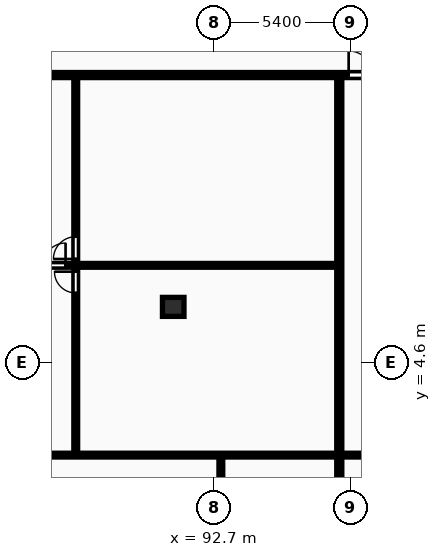
"""IFC4 building model, lengths in metres.
Left out: names, types, materials, properties, quantities, classifications, styles, units other than length and angle.
Written with IfcOpenShell. Run it as: python <this file> out.ifc"""

import sys

from ifc_helpers import new_model, si_unit, direction, frame, frame_2d, origin, origin_2d, place, context, subcontext, project, spatial, rectangle, extrude, element, fill, save


model = new_model("IFC4")
c1 = context("Model", 3, precision=1e-05, world=origin(), true_north=direction((0.0, 1.0)))
c2 = subcontext(c1, "Body", "Model", "MODEL_VIEW")
j1 = project(units=[si_unit("LENGTHUNIT", "METRE"), si_unit("PLANEANGLEUNIT", "RADIAN")], contexts=[c1])
p1 = place(None, origin())
s1 = spatial("IfcSite", under=j1, at=p1, CompositionType="ELEMENT")
p2 = place(p1, origin())
s2 = spatial("IfcBuilding", under=s1, at=p2, CompositionType="ELEMENT")
p3 = place(p2, frame((0.0, 0.0, 132.8)))
s3 = spatial("IfcBuildingStorey", under=s2, at=p3, CompositionType="ELEMENT", Elevation=132.8)
p4 = place(p3, frame((91.1, 6.8, 0.0), z_axis=(0.0, 0.0, 1.0), x_axis=(1.0, 0.0, 0.0)))
e1 = element("IfcColumn", 1, at=p4, inside=s3, PredefinedType="COLUMN", context=c2, shape_type="SweptSolid", body=[
    extrude(rectangle(XDim=0.85, YDim=0.75, at=origin_2d()), origin(), (0.0, 0.0, 1.0), 3.25),
])
p5 = place(p3, frame((97.655, -8.7, 0.0), z_axis=(0.0, 0.0, 1.0), x_axis=(0.0, 1.0, 0.0)))
e2 = element("IfcWall", 2, at=p5, inside=s3, PredefinedType="PARTITIONING", context=c2, shape_type="SweptSolid", body=[
    extrude(rectangle(XDim=24.57, YDim=0.2, at=frame_2d((12.285, 0.0))), origin(), (0.0, 0.0, 1.0), 2.97),
])
p6 = place(p3, frame((87.252, 0.99, 0.0), z_axis=(0.0, 0.0, 1.0), x_axis=(0.0, 1.0, 0.0)))
e3 = element("IfcWall", 3, at=p6, inside=s3, PredefinedType="PARTITIONING", context=c2, shape_type="SweptSolid", body=[
    extrude(rectangle(XDim=14.9, YDim=0.15, at=frame_2d((7.45, 0.0))), origin(), (0.0, 0.0, 1.0), 2.97),
])
p7 = place(p6, frame((6.36, 0.0, 0.0)))
e4 = element("IfcOpeningElement", 4, at=p7, cuts=e3, PredefinedType="OPENING", context=c2, shape_type="SweptSolid", body=[
    extrude(rectangle(XDim=0.84, YDim=2.04, at=frame_2d((0.42, 1.02))), frame((0.0, 0.085, 0.0), z_axis=(0.0, -1.0, 0.0), x_axis=(1.0, 0.0, 0.0)), (0.0, 0.0, 1.0), 0.17),
])
p8 = place(p6, frame((7.7, 0.0, 0.0)))
e5 = element("IfcOpeningElement", 5, at=p8, cuts=e3, PredefinedType="OPENING", context=c2, shape_type="SweptSolid", body=[
    extrude(rectangle(XDim=0.88, YDim=2.06, at=frame_2d((0.44, 1.03))), frame((0.0, 0.085, 0.0), z_axis=(0.0, -1.0, 0.0), x_axis=(1.0, 0.0, 0.0)), (0.0, 0.0, 1.0), 0.17),
])
p9 = place(p3, frame((76.73, 8.44, 0.0), z_axis=(0.0, 0.0, 1.0), x_axis=(1.0, 0.0, 0.0)))
e6 = element("IfcWall", 6, at=p9, inside=s3, PredefinedType="PARTITIONING", context=c2, shape_type="SweptSolid", body=[
    extrude(rectangle(XDim=20.844, YDim=0.15, at=frame_2d((10.422, 0.0))), origin(), (0.0, 0.0, 1.0), 2.97),
])
p10 = place(p9, frame((9.241, 0.0, 0.0)))
e7 = element("IfcOpeningElement", 7, at=p10, cuts=e6, PredefinedType="OPENING", context=c2, shape_type="SweptSolid", body=[
    extrude(rectangle(XDim=0.88, YDim=2.06, at=frame_2d((0.44, 1.03))), frame((0.0, 0.085, 0.0), z_axis=(0.0, -1.0, 0.0), x_axis=(1.0, 0.0, 0.0)), (0.0, 0.0, 1.0), 0.17),
])
p11 = place(p3, frame((92.98, -1.67, 0.0), z_axis=(0.0, 0.0, 1.0), x_axis=(0.0, 1.0, 0.0)))
e8 = element("IfcWall", 8, at=p11, inside=s3, PredefinedType="PARTITIONING", context=c2, shape_type="SweptSolid", body=[
    extrude(rectangle(XDim=2.58, YDim=0.15, at=frame_2d((1.29, 0.0))), origin(), (0.0, 0.0, 1.0), 2.97),
])
p12 = place(p3, frame((72.78, 0.95, 0.0), z_axis=(0.0, 0.0, 1.0), x_axis=(1.0, 0.0, 0.0)))
e9 = element("IfcWall", 9, at=p12, inside=s3, PredefinedType="PARTITIONING", context=c2, shape_type="SweptSolid", body=[
    extrude(rectangle(XDim=24.794, YDim=0.15, at=frame_2d((12.397, 0.0))), origin(), (0.0, 0.0, 1.0), 2.97),
])
p13 = place(p12, frame((2.72, 0.0, 0.0)))
e10 = element("IfcOpeningElement", 10, at=p13, cuts=e9, PredefinedType="OPENING", context=c2, shape_type="SweptSolid", body=[
    extrude(rectangle(XDim=0.92, YDim=2.08, at=frame_2d((0.46, 1.04))), frame((0.0, 0.085, 0.0), z_axis=(0.0, -1.0, 0.0), x_axis=(1.0, 0.0, 0.0)), (0.0, 0.0, 1.0), 0.17),
])
p14 = place(p3, frame((97.735, 0.95, 0.0), z_axis=(0.0, 0.0, 1.0), x_axis=(1.0, 0.0, 0.0)))
e11 = element("IfcWall", 11, at=p14, inside=s3, PredefinedType="PARTITIONING", context=c2, shape_type="SweptSolid", body=[
    extrude(rectangle(XDim=18.472, YDim=0.15, at=frame_2d((9.236, 0.0))), origin(), (0.0, 0.0, 1.0), 2.97),
])
p15 = place(p14, frame((2.72, 0.0, 0.0)))
e12 = element("IfcOpeningElement", 12, at=p15, cuts=e11, PredefinedType="OPENING", context=c2, shape_type="SweptSolid", body=[
    extrude(rectangle(XDim=0.92, YDim=2.08, at=frame_2d((0.46, 1.04))), frame((0.0, 0.085, 0.0), z_axis=(0.0, -1.0, 0.0), x_axis=(1.0, 0.0, 0.0)), (0.0, 0.0, 1.0), 0.17),
])
p16 = place(p3, frame((72.7, 15.95, 0.0), z_axis=(0.0, 0.0, 1.0), x_axis=(1.0, 0.0, 0.0)))
e13 = element("IfcWall", 13, at=p16, inside=s3, PredefinedType="PARTITIONING", context=c2, shape_type="SweptSolid", body=[
    extrude(rectangle(XDim=58.0, YDim=0.2, at=frame_2d((29.0, 0.0))), origin(), (0.0, 0.0, 1.0), 2.97),
])
p17 = place(p16, frame((2.77, 0.0, 0.0)))
e14 = element("IfcOpeningElement", 14, at=p17, cuts=e13, PredefinedType="OPENING", context=c2, shape_type="SweptSolid", body=[
    extrude(rectangle(XDim=0.95, YDim=2.15, at=frame_2d((0.475, 1.075))), frame((0.0, 0.11, 0.0), z_axis=(0.0, -1.0, 0.0), x_axis=(1.0, 0.0, 0.0)), (0.0, 0.0, 1.0), 0.22),
])
p18 = place(p16, frame((25.324, 0.0, 0.0)))
e15 = element("IfcOpeningElement", 15, at=p18, cuts=e13, PredefinedType="OPENING", context=c2, shape_type="SweptSolid", body=[
    extrude(rectangle(XDim=0.95, YDim=2.15, at=frame_2d((0.475, 1.075))), frame((0.0, 0.11, 0.0), z_axis=(0.0, -1.0, 0.0), x_axis=(1.0, 0.0, 0.0)), (0.0, 0.0, 1.0), 0.22),
])
p19 = place(p16, frame((46.356, 0.0, 0.0)))
e16 = element("IfcOpeningElement", 16, at=p19, cuts=e13, PredefinedType="OPENING", context=c2, shape_type="SweptSolid", body=[
    extrude(rectangle(XDim=0.95, YDim=2.15, at=frame_2d((0.475, 1.075))), frame((0.0, 0.11, 0.0), z_axis=(0.0, -1.0, 0.0), x_axis=(1.0, 0.0, 0.0)), (0.0, 0.0, 1.0), 0.22),
])
p20 = place(p7, origin())
e17 = element("IfcDoor", 17, at=p20, inside=s3, OperationType="SINGLE_SWING_RIGHT", PredefinedType="DOOR", context=c2, shape_type="SweptSolid", body=[
    extrude(rectangle(XDim=0.84, YDim=2.04, at=frame_2d((0.42, 1.02))), frame((0.0, 0.025, 0.0), z_axis=(0.0, -1.0, 0.0), x_axis=(1.0, 0.0, 0.0)), (0.0, 0.0, 1.0), 0.05),
])
fill(e4, e17)
p21 = place(p8, origin())
e18 = element("IfcDoor", 18, at=p21, inside=s3, OperationType="SINGLE_SWING_LEFT", PredefinedType="DOOR", context=c2, shape_type="SweptSolid", body=[
    extrude(rectangle(XDim=0.88, YDim=2.06, at=frame_2d((0.44, 1.03))), frame((0.0, 0.025, 0.0), z_axis=(0.0, -1.0, 0.0), x_axis=(1.0, 0.0, 0.0)), (0.0, 0.0, 1.0), 0.05),
])
fill(e5, e18)
p22 = place(p10, origin())
e19 = element("IfcDoor", 19, at=p22, inside=s3, OperationType="SINGLE_SWING_RIGHT", PredefinedType="DOOR", context=c2, shape_type="SweptSolid", body=[
    extrude(rectangle(XDim=0.88, YDim=2.06, at=frame_2d((0.44, 1.03))), frame((0.0, 0.025, 0.0), z_axis=(0.0, -1.0, 0.0), x_axis=(1.0, 0.0, 0.0)), (0.0, 0.0, 1.0), 0.05),
])
fill(e7, e19)
p23 = place(p18, origin())
e20 = element("IfcDoor", 20, at=p23, inside=s3, OperationType="SINGLE_SWING_LEFT", PredefinedType="DOOR", context=c2, shape_type="SweptSolid", body=[
    extrude(rectangle(XDim=0.95, YDim=2.15, at=frame_2d((0.475, 1.075))), frame((0.0, 0.025, 0.0), z_axis=(0.0, -1.0, 0.0), x_axis=(1.0, 0.0, 0.0)), (0.0, 0.0, 1.0), 0.05),
])
fill(e15, e20)
save(model, sys.argv[1])
